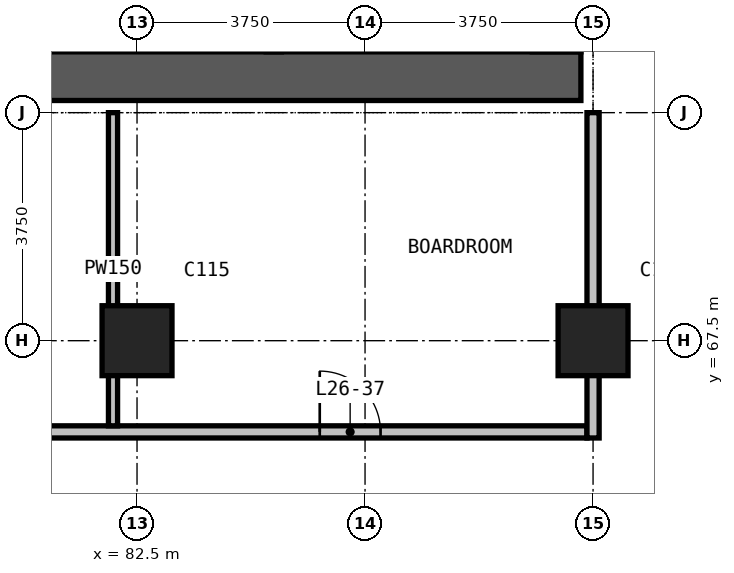
"""IFC4 building model, lengths in metres.
Left out: names, types, materials, properties, quantities, classifications, styles, units other than length and angle.
Written with IfcOpenShell. Run it as: python <this file> out.ifc"""

import sys

from ifc_helpers import new_model, si_unit, direction, frame, frame_2d, origin, origin_2d, place, context, subcontext, project, spatial, rectangle, extrude, element, fill, save


model = new_model("IFC4")
c1 = context("Model", 3, precision=1e-05, world=origin(), true_north=direction((0.0, 1.0)))
c2 = subcontext(c1, "Body", "Model", "MODEL_VIEW")
j1 = project(units=[si_unit("LENGTHUNIT", "METRE"), si_unit("PLANEANGLEUNIT", "RADIAN")], contexts=[c1])
p1 = place(None, origin())
s1 = spatial("IfcSite", under=j1, at=p1, CompositionType="ELEMENT")
p2 = place(p1, origin())
s2 = spatial("IfcBuilding", under=s1, at=p2, CompositionType="ELEMENT")
p3 = place(p2, frame((0.0, 0.0, 107.2)))
s3 = spatial("IfcBuildingStorey", under=s2, at=p3, CompositionType="ELEMENT", Elevation=107.2)
for number, where, z_axis, x_axis in (
    (1, (82.5, 67.5, 0.0), (0.0, 0.0, 1.0), (1.0, 0.0, 0.0)),
    (2, (90.0, 67.5, 0.0), (0.0, 0.0, 1.0), (1.0, 0.0, 0.0)),
):
    element("IfcColumn", number, at=place(p3, frame(where, z_axis=z_axis, x_axis=x_axis)), inside=s3, PredefinedType="COLUMN", context=c2, shape_type="SweptSolid", body=[
        extrude(rectangle(XDim=1.15, YDim=1.15, at=origin_2d()), origin(), (0.0, 0.0, 1.0), 3.6),
    ])
p4 = place(p3, frame((60.2, 71.85, 0.0), z_axis=(0.0, 0.0, 1.0), x_axis=(1.0, 0.0, 0.0)))
e3 = element("IfcWall", 3, at=p4, inside=s3, PredefinedType="SHEAR", context=c2, shape_type="SweptSolid", body=[
    extrude(rectangle(XDim=29.6, YDim=0.8, at=frame_2d((14.8, 0.0))), origin(), (0.0, 0.0, 1.0), 3.6),
])
p5 = place(p3, frame((66.416, 66.0, 0.0), z_axis=(0.0, 0.0, 1.0), x_axis=(1.0, 0.0, 0.0)))
e4 = element("IfcWall", 4, at=p5, inside=s3, PredefinedType="PARTITIONING", context=c2, shape_type="SweptSolid", body=[
    extrude(rectangle(XDim=23.484, YDim=0.2, at=frame_2d((11.742, 0.0))), origin(), (0.0, 0.0, 1.0), 3.3),
])
p6 = place(p5, frame((7.0, 0.0, 0.0)))
e5 = element("IfcOpeningElement", 5, at=p6, cuts=e4, PredefinedType="OPENING", context=c2, shape_type="SweptSolid", body=[
    extrude(rectangle(XDim=1.0, YDim=2.2, at=frame_2d((0.5, 1.1))), frame((0.0, 0.11, 0.0), z_axis=(0.0, -1.0, 0.0), x_axis=(1.0, 0.0, 0.0)), (0.0, 0.0, 1.0), 0.22),
])
p7 = place(p5, frame((19.089, 0.0, 0.0)))
e6 = element("IfcOpeningElement", 6, at=p7, cuts=e4, PredefinedType="OPENING", context=c2, shape_type="SweptSolid", body=[
    extrude(rectangle(XDim=1.0, YDim=2.2, at=frame_2d((0.5, 1.1))), frame((0.0, 0.11, 0.0), z_axis=(0.0, -1.0, 0.0), x_axis=(1.0, 0.0, 0.0)), (0.0, 0.0, 1.0), 0.22),
])
p8 = place(p3, frame((90.0, 65.9, 0.0), z_axis=(0.0, 0.0, 1.0), x_axis=(0.0, 1.0, 0.0)))
e7 = element("IfcWall", 7, at=p8, inside=s3, PredefinedType="PARTITIONING", context=c2, shape_type="SweptSolid", body=[
    extrude(rectangle(XDim=5.35, YDim=0.2, at=frame_2d((2.675, 0.0))), origin(), (0.0, 0.0, 1.0), 3.3),
])
p9 = place(p3, frame((82.105, 66.1, 0.0), z_axis=(0.0, 0.0, 1.0), x_axis=(0.0, 1.0, 0.0)))
e8 = element("IfcWall", 8, at=p9, inside=s3, PredefinedType="PARTITIONING", context=c2, shape_type="SweptSolid", body=[
    extrude(rectangle(XDim=5.15, YDim=0.15, at=frame_2d((2.575, 0.0))), origin(), (0.0, 0.0, 1.0), 3.3),
])
p10 = place(p7, origin())
e9 = element("IfcDoor", 9, at=p10, inside=s3, OperationType="SINGLE_SWING_LEFT", PredefinedType="DOOR", context=c2, shape_type="SweptSolid", body=[
    extrude(rectangle(XDim=1.0, YDim=2.2, at=frame_2d((0.5, 1.1))), frame((0.0, 0.025, 0.0), z_axis=(0.0, -1.0, 0.0), x_axis=(1.0, 0.0, 0.0)), (0.0, 0.0, 1.0), 0.05),
])
fill(e6, e9)
save(model, sys.argv[1])
